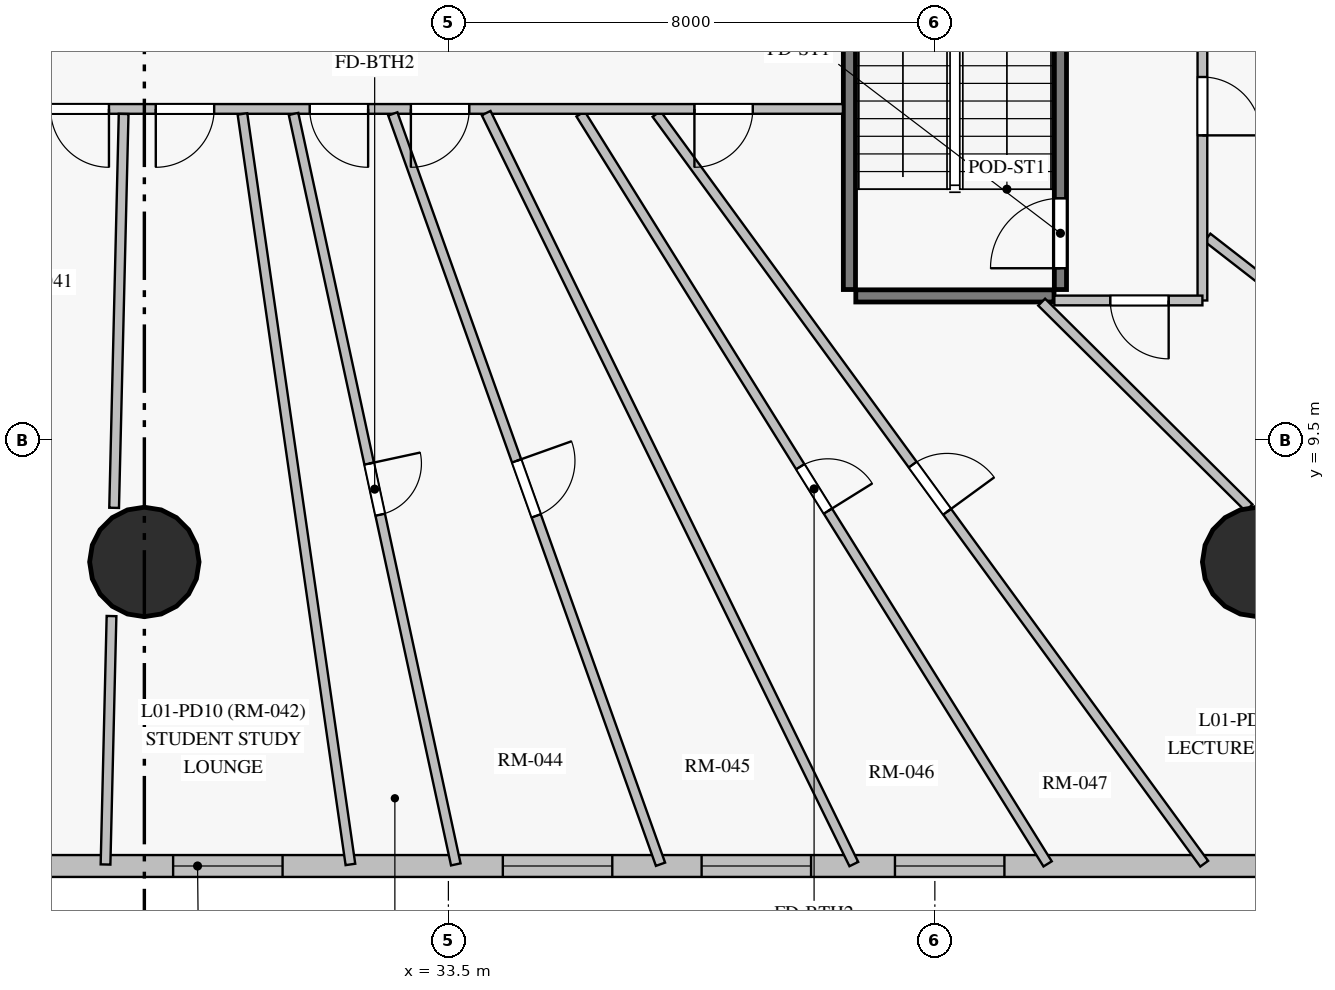
"""IFC4 building model, lengths in metres.
Left out: names, types, materials, properties, quantities, classifications, styles, units other than length and angle.
Written with IfcOpenShell. Run it as: python <this file> out.ifc"""

import sys

from ifc_helpers import new_model, si_unit, direction, frame, frame_2d, origin, origin_with_axes, origin_2d, place, context, subcontext, project, spatial, rectangle, circle, extrude, source, transform, mapped, element, fill, save


model = new_model("IFC4")
c1 = context("Model", 3, precision=1e-05, world=origin(), true_north=direction((0.0, 1.0)))
c2 = subcontext(c1, "Body", "Model", "MODEL_VIEW")
j1 = project(units=[si_unit("LENGTHUNIT", "METRE"), si_unit("PLANEANGLEUNIT", "RADIAN")], contexts=[c1])
p1 = place(None, origin())
s1 = spatial("IfcSite", under=j1, at=p1, CompositionType="ELEMENT")
p2 = place(p1, origin())
s2 = spatial("IfcBuilding", under=s1, at=p2, CompositionType="ELEMENT")
p3 = place(p2, frame((0.0, 0.0, 4.5)))
s3 = spatial("IfcBuildingStorey", under=s2, at=p3, CompositionType="ELEMENT", Elevation=4.5)
m1 = source(origin_with_axes(), c2, "Body", "SweptSolid", [
    extrude(circle(Radius=0.9, at=origin_2d()), origin(), (0.0, 0.0, 1.0), 4.5),
])
for number, where, z_axis, x_axis in (
    (1, (28.5, 7.5, 0.0), (0.0, 0.0, 1.0), (1.0, 0.0, 0.0)),
    (2, (46.8, 7.5, 0.0), (0.0, 0.0, 1.0), (1.0, 0.0, 0.0)),
):
    element("IfcColumn", number, at=place(p3, frame(where, z_axis=z_axis, x_axis=x_axis)), inside=s3, PredefinedType="COLUMN", context=c2, shape_type="MappedRepresentation", body=[
        mapped(m1, transform((0.0, 0.0, 0.0), scale=1.0)),
    ])
p4 = place(p3, frame((3.45, 2.5, 0.0), z_axis=(0.0, 0.0, 1.0), x_axis=(1.0, 0.0, 0.0)))
e3 = element("IfcWall", 3, at=p4, inside=s3, PredefinedType="SOLIDWALL", context=c2, shape_type="SweptSolid", body=[
    extrude(rectangle(XDim=51.85, YDim=0.36, at=frame_2d((25.925, 0.0))), origin(), (0.0, 0.0, 1.0), 4.2),
])
p5 = place(p4, frame((1.516, 0.0, 0.85)))
e4 = element("IfcOpeningElement", 4, at=p5, cuts=e3, PredefinedType="OPENING", context=c2, shape_type="SweptSolid", body=[
    extrude(rectangle(XDim=1.8, YDim=2.2, at=frame_2d((0.9, 1.1))), frame((0.0, 0.19, 0.0), z_axis=(0.0, -1.0, 0.0), x_axis=(1.0, 0.0, 0.0)), (0.0, 0.0, 1.0), 0.38),
])
p6 = place(p4, frame((6.037, 0.0, 0.85)))
e5 = element("IfcOpeningElement", 5, at=p6, cuts=e3, PredefinedType="OPENING", context=c2, shape_type="SweptSolid", body=[
    extrude(rectangle(XDim=1.8, YDim=2.2, at=frame_2d((0.9, 1.1))), frame((0.0, 0.19, 0.0), z_axis=(0.0, -1.0, 0.0), x_axis=(1.0, 0.0, 0.0)), (0.0, 0.0, 1.0), 0.38),
])
p7 = place(p4, frame((12.611, 0.0, 0.85)))
e6 = element("IfcOpeningElement", 6, at=p7, cuts=e3, PredefinedType="OPENING", context=c2, shape_type="SweptSolid", body=[
    extrude(rectangle(XDim=1.8, YDim=2.2, at=frame_2d((0.9, 1.1))), frame((0.0, 0.19, 0.0), z_axis=(0.0, -1.0, 0.0), x_axis=(1.0, 0.0, 0.0)), (0.0, 0.0, 1.0), 0.38),
])
p8 = place(p4, frame((18.95, 0.0, 0.85)))
e7 = element("IfcOpeningElement", 7, at=p8, cuts=e3, PredefinedType="OPENING", context=c2, shape_type="SweptSolid", body=[
    extrude(rectangle(XDim=1.8, YDim=2.2, at=frame_2d((0.9, 1.1))), frame((0.0, 0.19, 0.0), z_axis=(0.0, -1.0, 0.0), x_axis=(1.0, 0.0, 0.0)), (0.0, 0.0, 1.0), 0.38),
])
p9 = place(p4, frame((25.523, 0.0, 0.85)))
e8 = element("IfcOpeningElement", 8, at=p9, cuts=e3, PredefinedType="OPENING", context=c2, shape_type="SweptSolid", body=[
    extrude(rectangle(XDim=1.8, YDim=2.2, at=frame_2d((0.9, 1.1))), frame((0.0, 0.19, 0.0), z_axis=(0.0, -1.0, 0.0), x_axis=(1.0, 0.0, 0.0)), (0.0, 0.0, 1.0), 0.38),
])
p10 = place(p4, frame((30.945, 0.0, 0.85)))
e9 = element("IfcOpeningElement", 9, at=p10, cuts=e3, PredefinedType="OPENING", context=c2, shape_type="SweptSolid", body=[
    extrude(rectangle(XDim=1.8, YDim=2.2, at=frame_2d((0.9, 1.1))), frame((0.0, 0.19, 0.0), z_axis=(0.0, -1.0, 0.0), x_axis=(1.0, 0.0, 0.0)), (0.0, 0.0, 1.0), 0.38),
])
p11 = place(p4, frame((34.214, 0.0, 0.85)))
e10 = element("IfcOpeningElement", 10, at=p11, cuts=e3, PredefinedType="OPENING", context=c2, shape_type="SweptSolid", body=[
    extrude(rectangle(XDim=1.8, YDim=2.2, at=frame_2d((0.9, 1.1))), frame((0.0, 0.19, 0.0), z_axis=(0.0, -1.0, 0.0), x_axis=(1.0, 0.0, 0.0)), (0.0, 0.0, 1.0), 0.38),
])
p12 = place(p4, frame((37.394, 0.0, 0.85)))
e11 = element("IfcOpeningElement", 11, at=p12, cuts=e3, PredefinedType="OPENING", context=c2, shape_type="SweptSolid", body=[
    extrude(rectangle(XDim=1.8, YDim=2.2, at=frame_2d((0.9, 1.1))), frame((0.0, 0.19, 0.0), z_axis=(0.0, -1.0, 0.0), x_axis=(1.0, 0.0, 0.0)), (0.0, 0.0, 1.0), 0.38),
])
p13 = place(p4, frame((44.871, 0.0, 0.85)))
e12 = element("IfcOpeningElement", 12, at=p13, cuts=e3, PredefinedType="OPENING", context=c2, shape_type="SweptSolid", body=[
    extrude(rectangle(XDim=1.8, YDim=2.2, at=frame_2d((0.9, 1.1))), frame((0.0, 0.19, 0.0), z_axis=(0.0, -1.0, 0.0), x_axis=(1.0, 0.0, 0.0)), (0.0, 0.0, 1.0), 0.38),
])
p14 = place(p3, frame((40.095, 11.98, 0.0), z_axis=(0.0, 0.0, 1.0), x_axis=(0.0, 1.0, 0.0)))
e13 = element("IfcWall", 13, at=p14, inside=s3, PredefinedType="SHEAR", context=c2, shape_type="SweptSolid", body=[
    extrude(rectangle(XDim=7.35, YDim=0.2, at=frame_2d((3.675, 0.0))), origin(), (0.0, 0.0, 1.0), 4.2),
])
p15 = place(p3, frame((43.565, 11.98, 0.0), z_axis=(0.0, 0.0, 1.0), x_axis=(0.0, 1.0, 0.0)))
e14 = element("IfcWall", 14, at=p15, inside=s3, PredefinedType="SHEAR", context=c2, shape_type="SweptSolid", body=[
    extrude(rectangle(XDim=7.35, YDim=0.2, at=frame_2d((3.675, 0.0))), origin(), (0.0, 0.0, 1.0), 4.2),
])
p16 = place(p15, frame((0.35, 0.0, 0.0)))
e15 = element("IfcOpeningElement", 15, at=p16, cuts=e14, PredefinedType="OPENING", context=c2, shape_type="SweptSolid", body=[
    extrude(rectangle(XDim=1.15, YDim=2.15, at=frame_2d((0.575, 1.075))), frame((0.0, 0.11, 0.0), z_axis=(0.0, -1.0, 0.0), x_axis=(1.0, 0.0, 0.0)), (0.0, 0.0, 1.0), 0.22),
])
p17 = place(p3, frame((40.2, 11.875, 0.0), z_axis=(0.0, 0.0, 1.0), x_axis=(1.0, 0.0, 0.0)))
e16 = element("IfcWall", 16, at=p17, inside=s3, PredefinedType="SHEAR", context=c2, shape_type="SweptSolid", body=[
    extrude(rectangle(XDim=3.26, YDim=0.2, at=frame_2d((1.63, 0.0))), origin(), (0.0, 0.0, 1.0), 4.2),
])
p18 = place(p3, frame((40.918, 21.214, 0.0), z_axis=(0.0, 0.0, 1.0), x_axis=(0.921837584327, -0.387576402947, 0.0)))
e17 = element("IfcWall", 17, at=p18, inside=s3, PredefinedType="PARTITIONING", context=c2, shape_type="SweptSolid", body=[
    extrude(rectangle(XDim=16.762, YDim=0.16, at=frame_2d((8.381, 0.0))), origin(), (0.0, 0.0, 1.0), 4.2),
])
p19 = place(p18, frame((7.881, 0.0, 0.0)))
e18 = element("IfcOpeningElement", 18, at=p19, cuts=e17, PredefinedType="OPENING", context=c2, shape_type="SweptSolid", body=[
    extrude(rectangle(XDim=0.96, YDim=2.15, at=frame_2d((0.48, 1.075))), frame((0.0, 0.09, 0.0), z_axis=(0.0, -1.0, 0.0), x_axis=(1.0, 0.0, 0.0)), (0.0, 0.0, 1.0), 0.18),
])
p20 = place(p3, frame((36.923, 14.868, 0.0), z_axis=(0.0, 0.0, 1.0), x_axis=(0.589855025389, -0.80750916343, 0.0)))
e19 = element("IfcWall", 19, at=p20, inside=s3, PredefinedType="PARTITIONING", context=c2, shape_type="SweptSolid", body=[
    extrude(rectangle(XDim=15.27, YDim=0.16, at=frame_2d((7.635, 0.0))), origin(), (0.0, 0.0, 1.0), 4.2),
])
p21 = place(p20, frame((7.142, 0.0, 0.0)))
e20 = element("IfcOpeningElement", 20, at=p21, cuts=e19, PredefinedType="OPENING", context=c2, shape_type="SweptSolid", body=[
    extrude(rectangle(XDim=0.96, YDim=2.15, at=frame_2d((0.48, 1.075))), frame((0.0, 0.09, 0.0), z_axis=(0.0, -1.0, 0.0), x_axis=(1.0, 0.0, 0.0)), (0.0, 0.0, 1.0), 0.18),
])
p22 = place(p3, frame((35.674, 14.868, 0.0), z_axis=(0.0, 0.0, 1.0), x_axis=(0.528650980247, -0.848839290492, 0.0)))
e21 = element("IfcWall", 21, at=p22, inside=s3, PredefinedType="PARTITIONING", context=c2, shape_type="SweptSolid", body=[
    extrude(rectangle(XDim=14.529, YDim=0.16, at=frame_2d((7.265, 0.0))), origin(), (0.0, 0.0, 1.0), 4.2),
])
p23 = place(p22, frame((6.835, 0.0, 0.0)))
e22 = element("IfcOpeningElement", 22, at=p23, cuts=e21, PredefinedType="OPENING", context=c2, shape_type="SweptSolid", body=[
    extrude(rectangle(XDim=0.86, YDim=2.04, at=frame_2d((0.43, 1.02))), frame((0.0, 0.09, 0.0), z_axis=(0.0, -1.0, 0.0), x_axis=(1.0, 0.0, 0.0)), (0.0, 0.0, 1.0), 0.18),
])
p24 = place(p3, frame((39.988, 14.95, 0.0), z_axis=(0.0, 0.0, 1.0), x_axis=(-1.0, 0.0, 0.0)))
e23 = element("IfcWall", 23, at=p24, inside=s3, PredefinedType="PARTITIONING", context=c2, shape_type="SweptSolid", body=[
    extrude(rectangle(XDim=14.588, YDim=0.16, at=frame_2d((7.294, 0.0))), origin(), (0.0, 0.0, 1.0), 4.2),
])
p25 = place(p24, frame((10.34, 0.0, 0.0)))
e24 = element("IfcOpeningElement", 24, at=p25, cuts=e23, PredefinedType="OPENING", context=c2, shape_type="SweptSolid", body=[
    extrude(rectangle(XDim=0.96, YDim=2.15, at=frame_2d((0.48, 1.075))), frame((0.0, 0.09, 0.0), z_axis=(0.0, -1.0, 0.0), x_axis=(1.0, 0.0, 0.0)), (0.0, 0.0, 1.0), 0.18),
])
p26 = place(p24, frame((7.808, 0.0, 0.0)))
e25 = element("IfcOpeningElement", 25, at=p26, cuts=e23, PredefinedType="OPENING", context=c2, shape_type="SweptSolid", body=[
    extrude(rectangle(XDim=0.96, YDim=2.15, at=frame_2d((0.48, 1.075))), frame((0.0, 0.09, 0.0), z_axis=(0.0, -1.0, 0.0), x_axis=(1.0, 0.0, 0.0)), (0.0, 0.0, 1.0), 0.18),
])
p27 = place(p24, frame((6.145, 0.0, 0.0)))
e26 = element("IfcOpeningElement", 26, at=p27, cuts=e23, PredefinedType="OPENING", context=c2, shape_type="SweptSolid", body=[
    extrude(rectangle(XDim=0.96, YDim=2.15, at=frame_2d((0.48, 1.075))), frame((0.0, 0.09, 0.0), z_axis=(0.0, -1.0, 0.0), x_axis=(1.0, 0.0, 0.0)), (0.0, 0.0, 1.0), 0.18),
])
p28 = place(p24, frame((1.482, 0.0, 0.0)))
e27 = element("IfcOpeningElement", 27, at=p28, cuts=e23, PredefinedType="OPENING", context=c2, shape_type="SweptSolid", body=[
    extrude(rectangle(XDim=0.96, YDim=2.15, at=frame_2d((0.48, 1.075))), frame((0.0, 0.09, 0.0), z_axis=(0.0, -1.0, 0.0), x_axis=(1.0, 0.0, 0.0)), (0.0, 0.0, 1.0), 0.18),
])
p29 = place(p24, frame((12.07, 0.0, 0.0)))
e28 = element("IfcOpeningElement", 28, at=p29, cuts=e23, PredefinedType="OPENING", context=c2, shape_type="SweptSolid", body=[
    extrude(rectangle(XDim=0.96, YDim=2.15, at=frame_2d((0.48, 1.075))), frame((0.0, 0.09, 0.0), z_axis=(0.0, -1.0, 0.0), x_axis=(1.0, 0.0, 0.0)), (0.0, 0.0, 1.0), 0.18),
])
p30 = place(p3, frame((34.121, 14.882, 0.0), z_axis=(0.0, 0.0, 1.0), x_axis=(0.439712558425, -0.898138556105, 0.0)))
e29 = element("IfcWall", 29, at=p30, inside=s3, PredefinedType="PARTITIONING", context=c2, shape_type="SweptSolid", body=[
    extrude(rectangle(XDim=13.751, YDim=0.16, at=frame_2d((6.875, 0.0))), origin(), (0.0, 0.0, 1.0), 4.2),
])
p31 = place(p3, frame((45.982, 12.836, 0.0), z_axis=(0.0, 0.0, 1.0), x_axis=(0.789554176815, -0.613680863214, 0.0)))
e30 = element("IfcWall", 30, at=p31, inside=s3, PredefinedType="PARTITIONING", context=c2, shape_type="SweptSolid", body=[
    extrude(rectangle(XDim=13.146, YDim=0.16, at=frame_2d((6.573, 0.0))), origin(), (0.0, 0.0, 1.0), 4.2),
])
p32 = place(p3, frame((32.586, 14.868, 0.0), z_axis=(0.0, 0.0, 1.0), x_axis=(0.336016454354, -0.941856115552, 0.0)))
e31 = element("IfcWall", 31, at=p32, inside=s3, PredefinedType="PARTITIONING", context=c2, shape_type="SweptSolid", body=[
    extrude(rectangle(XDim=13.101, YDim=0.16, at=frame_2d((6.55, 0.0))), origin(), (0.0, 0.0, 1.0), 4.2),
])
p33 = place(p32, frame((6.058, 0.0, 0.0)))
e32 = element("IfcOpeningElement", 32, at=p33, cuts=e31, PredefinedType="OPENING", context=c2, shape_type="SweptSolid", body=[
    extrude(rectangle(XDim=0.96, YDim=2.15, at=frame_2d((0.48, 1.075))), frame((0.0, 0.09, 0.0), z_axis=(0.0, -1.0, 0.0), x_axis=(1.0, 0.0, 0.0)), (0.0, 0.0, 1.0), 0.18),
])
p34 = place(p3, frame((30.954, 14.868, 0.0), z_axis=(0.0, 0.0, 1.0), x_axis=(0.211300840562, -0.977421073426, 0.0)))
e33 = element("IfcWall", 33, at=p34, inside=s3, PredefinedType="PARTITIONING", context=c2, shape_type="SweptSolid", body=[
    extrude(rectangle(XDim=12.626, YDim=0.16, at=frame_2d((6.313, 0.0))), origin(), (0.0, 0.0, 1.0), 4.2),
])
p35 = place(p34, frame((5.883, 0.0, 0.0)))
e34 = element("IfcOpeningElement", 34, at=p35, cuts=e33, PredefinedType="OPENING", context=c2, shape_type="SweptSolid", body=[
    extrude(rectangle(XDim=0.86, YDim=2.04, at=frame_2d((0.43, 1.02))), frame((0.0, 0.09, 0.0), z_axis=(0.0, -1.0, 0.0), x_axis=(1.0, 0.0, 0.0)), (0.0, 0.0, 1.0), 0.18),
])
p36 = place(p3, frame((30.113, 14.868, 0.0), z_axis=(0.0, 0.0, 1.0), x_axis=(0.142419040013, -0.989806454334, 0.0)))
e35 = element("IfcWall", 35, at=p36, inside=s3, PredefinedType="PARTITIONING", context=c2, shape_type="SweptSolid", body=[
    extrude(rectangle(XDim=12.469, YDim=0.16, at=frame_2d((6.235, 0.0))), origin(), (0.0, 0.0, 1.0), 4.2),
])
p37 = place(p3, frame((45.982, 16.669, 0.0), z_axis=(0.0, 0.0, 1.0), x_axis=(0.873084325339, -0.487569236978, 0.0)))
e36 = element("IfcWall", 36, at=p37, inside=s3, PredefinedType="PARTITIONING", context=c2, shape_type="SweptSolid", body=[
    extrude(rectangle(XDim=11.894, YDim=0.16, at=frame_2d((5.947, 0.0))), origin(), (0.0, 0.0, 1.0), 4.2),
])
p38 = place(p3, frame((28.159, 14.868, 0.0), z_axis=(0.0, 0.0, 1.0), x_axis=(-0.024112983848, -0.999709239734, 0.0)))
e37 = element("IfcWall", 37, at=p38, inside=s3, PredefinedType="PARTITIONING", context=c2, shape_type="SweptSolid", body=[
    extrude(rectangle(XDim=6.48, YDim=0.16, at=frame_2d((3.24, 0.0))), origin(), (0.0, 0.0, 1.0), 3.25),
])
p39 = place(p3, frame((45.9, 18.2, 0.0), z_axis=(0.0, 0.0, 1.0), x_axis=(0.0, -1.0, 0.0)))
e38 = element("IfcWall", 38, at=p39, inside=s3, PredefinedType="PARTITIONING", context=c2, shape_type="SweptSolid", body=[
    extrude(rectangle(XDim=6.4, YDim=0.16, at=frame_2d((3.2, 0.0))), origin(), (0.0, 0.0, 1.0), 4.2),
])
p40 = place(p39, frame((2.725, 0.0, 0.0)))
e39 = element("IfcOpeningElement", 39, at=p40, cuts=e38, PredefinedType="OPENING", context=c2, shape_type="SweptSolid", body=[
    extrude(rectangle(XDim=0.96, YDim=2.15, at=frame_2d((0.48, 1.075))), frame((0.0, 0.09, 0.0), z_axis=(0.0, -1.0, 0.0), x_axis=(1.0, 0.0, 0.0)), (0.0, 0.0, 1.0), 0.18),
])
p41 = place(p3, frame((43.257, 11.773, 0.0), z_axis=(0.0, 0.0, 1.0), x_axis=(0.709846294383, -0.704356613052, 0.0)))
e40 = element("IfcWall", 40, at=p41, inside=s3, PredefinedType="PARTITIONING", context=c2, shape_type="SweptSolid", body=[
    extrude(rectangle(XDim=4.803, YDim=0.16, at=frame_2d((2.401, 0.0))), origin(), (0.0, 0.0, 1.0), 3.25),
])
p42 = place(p3, frame((27.96, 6.61, 0.0), z_axis=(0.0, 0.0, 1.0), x_axis=(-0.024077163183, -0.999710103086, 0.0)))
e41 = element("IfcWall", 41, at=p42, inside=s3, PredefinedType="PARTITIONING", context=c2, shape_type="SweptSolid", body=[
    extrude(rectangle(XDim=4.086, YDim=0.16, at=frame_2d((2.043, 0.0))), origin(), (0.0, 0.0, 1.0), 4.2),
])
p43 = place(p3, frame((45.9, 11.8, 0.0), z_axis=(0.0, 0.0, 1.0), x_axis=(-1.0, 0.0, 0.0)))
e42 = element("IfcWall", 42, at=p43, inside=s3, PredefinedType="PARTITIONING", context=c2, shape_type="SweptSolid", body=[
    extrude(rectangle(XDim=2.435, YDim=0.16, at=frame_2d((1.217, 0.0))), origin(), (0.0, 0.0, 1.0), 4.2),
])
p44 = place(p43, frame((0.555, 0.0, 0.0)))
e43 = element("IfcOpeningElement", 43, at=p44, cuts=e42, PredefinedType="OPENING", context=c2, shape_type="SweptSolid", body=[
    extrude(rectangle(XDim=0.96, YDim=2.15, at=frame_2d((0.48, 1.075))), frame((0.0, 0.09, 0.0), z_axis=(0.0, -1.0, 0.0), x_axis=(1.0, 0.0, 0.0)), (0.0, 0.0, 1.0), 0.18),
])
m2 = source(origin_with_axes(), c2, "Body", "SweptSolid", [
    extrude(rectangle(XDim=1.8, YDim=2.2, at=frame_2d((0.9, 1.1))), frame((0.0, 0.03, 0.0), z_axis=(0.0, -1.0, 0.0), x_axis=(1.0, 0.0, 0.0)), (0.0, 0.0, 1.0), 0.06),
])
p45 = place(p9, origin())
e44 = element("IfcWindow", 44, at=p45, inside=s3, PartitioningType="SINGLE_PANEL", PredefinedType="WINDOW", context=c2, shape_type="MappedRepresentation", body=[
    mapped(m2, transform((0.0, 0.0, 0.0), scale=1.0)),
])
fill(e8, e44)
p46 = place(p10, origin())
e45 = element("IfcWindow", 45, at=p46, inside=s3, PartitioningType="SINGLE_PANEL", PredefinedType="WINDOW", context=c2, shape_type="MappedRepresentation", body=[
    mapped(m2, transform((0.0, 0.0, 0.0), scale=1.0)),
])
fill(e9, e45)
p47 = place(p11, origin())
e46 = element("IfcWindow", 46, at=p47, inside=s3, PartitioningType="SINGLE_PANEL", PredefinedType="WINDOW", context=c2, shape_type="MappedRepresentation", body=[
    mapped(m2, transform((0.0, 0.0, 0.0), scale=1.0)),
])
fill(e10, e46)
p48 = place(p12, origin())
e47 = element("IfcWindow", 47, at=p48, inside=s3, PartitioningType="SINGLE_PANEL", PredefinedType="WINDOW", context=c2, shape_type="MappedRepresentation", body=[
    mapped(m2, transform((0.0, 0.0, 0.0), scale=1.0)),
])
fill(e11, e47)
m3 = source(origin_with_axes(), c2, "Body", "SweptSolid", [
    extrude(rectangle(XDim=1.15, YDim=2.15, at=frame_2d((0.575, 1.075))), frame((0.0, 0.025, 0.0), z_axis=(0.0, -1.0, 0.0), x_axis=(1.0, 0.0, 0.0)), (0.0, 0.0, 1.0), 0.05),
])
p49 = place(p16, origin())
e48 = element("IfcDoor", 48, at=p49, inside=s3, OperationType="SINGLE_SWING_LEFT", PredefinedType="DOOR", context=c2, shape_type="MappedRepresentation", body=[
    mapped(m3, transform((0.0, 0.0, 0.0), scale=1.0)),
])
fill(e15, e48)
m4 = source(origin_with_axes(), c2, "Body", "SweptSolid", [
    extrude(rectangle(XDim=0.96, YDim=2.15, at=frame_2d((0.48, 1.075))), frame((0.0, 0.025, 0.0), z_axis=(0.0, -1.0, 0.0), x_axis=(1.0, 0.0, 0.0)), (0.0, 0.0, 1.0), 0.05),
])
p50 = place(p25, origin())
e49 = element("IfcDoor", 49, at=p50, inside=s3, OperationType="SINGLE_SWING_RIGHT", PredefinedType="DOOR", context=c2, shape_type="MappedRepresentation", body=[
    mapped(m4, transform((0.0, 0.0, 0.0), scale=1.0)),
])
fill(e24, e49)
p51 = place(p26, origin())
e50 = element("IfcDoor", 50, at=p51, inside=s3, OperationType="SINGLE_SWING_LEFT", PredefinedType="DOOR", context=c2, shape_type="MappedRepresentation", body=[
    mapped(m4, transform((0.0, 0.0, 0.0), scale=1.0)),
])
fill(e25, e50)
p52 = place(p27, origin())
e51 = element("IfcDoor", 51, at=p52, inside=s3, OperationType="SINGLE_SWING_RIGHT", PredefinedType="DOOR", context=c2, shape_type="MappedRepresentation", body=[
    mapped(m4, transform((0.0, 0.0, 0.0), scale=1.0)),
])
fill(e26, e51)
p53 = place(p33, origin())
e52 = element("IfcDoor", 52, at=p53, inside=s3, OperationType="SINGLE_SWING_LEFT", PredefinedType="DOOR", context=c2, shape_type="MappedRepresentation", body=[
    mapped(m4, transform((0.0, 0.0, 0.0), scale=1.0)),
])
fill(e32, e52)
p54 = place(p28, origin())
e53 = element("IfcDoor", 53, at=p54, inside=s3, OperationType="SINGLE_SWING_RIGHT", PredefinedType="DOOR", context=c2, shape_type="MappedRepresentation", body=[
    mapped(m4, transform((0.0, 0.0, 0.0), scale=1.0)),
])
fill(e27, e53)
p55 = place(p29, origin())
e54 = element("IfcDoor", 54, at=p55, inside=s3, OperationType="SINGLE_SWING_LEFT", PredefinedType="DOOR", context=c2, shape_type="MappedRepresentation", body=[
    mapped(m4, transform((0.0, 0.0, 0.0), scale=1.0)),
])
fill(e28, e54)
p56 = place(p21, origin())
e55 = element("IfcDoor", 55, at=p56, inside=s3, OperationType="SINGLE_SWING_RIGHT", PredefinedType="DOOR", context=c2, shape_type="MappedRepresentation", body=[
    mapped(m4, transform((0.0, 0.0, 0.0), scale=1.0)),
])
fill(e20, e55)
p57 = place(p44, origin())
e56 = element("IfcDoor", 56, at=p57, inside=s3, OperationType="SINGLE_SWING_LEFT", PredefinedType="DOOR", context=c2, shape_type="MappedRepresentation", body=[
    mapped(m4, transform((0.0, 0.0, 0.0), scale=1.0)),
])
fill(e43, e56)
p58 = place(p40, origin())
e57 = element("IfcDoor", 57, at=p58, inside=s3, OperationType="SINGLE_SWING_RIGHT", PredefinedType="DOOR", context=c2, shape_type="MappedRepresentation", body=[
    mapped(m4, transform((0.0, 0.0, 0.0), scale=1.0)),
])
fill(e39, e57)
m5 = source(origin_with_axes(), c2, "Body", "SweptSolid", [
    extrude(rectangle(XDim=0.86, YDim=2.04, at=frame_2d((0.43, 1.02))), frame((0.0, 0.025, 0.0), z_axis=(0.0, -1.0, 0.0), x_axis=(1.0, 0.0, 0.0)), (0.0, 0.0, 1.0), 0.05),
])
p59 = place(p35, origin())
e58 = element("IfcDoor", 58, at=p59, inside=s3, OperationType="SINGLE_SWING_LEFT", PredefinedType="DOOR", context=c2, shape_type="MappedRepresentation", body=[
    mapped(m5, transform((0.0, 0.0, 0.0), scale=1.0)),
])
fill(e34, e58)
p60 = place(p23, origin())
e59 = element("IfcDoor", 59, at=p60, inside=s3, OperationType="SINGLE_SWING_RIGHT", PredefinedType="DOOR", context=c2, shape_type="MappedRepresentation", body=[
    mapped(m5, transform((0.0, 0.0, 0.0), scale=1.0)),
])
fill(e22, e59)
save(model, sys.argv[1])
